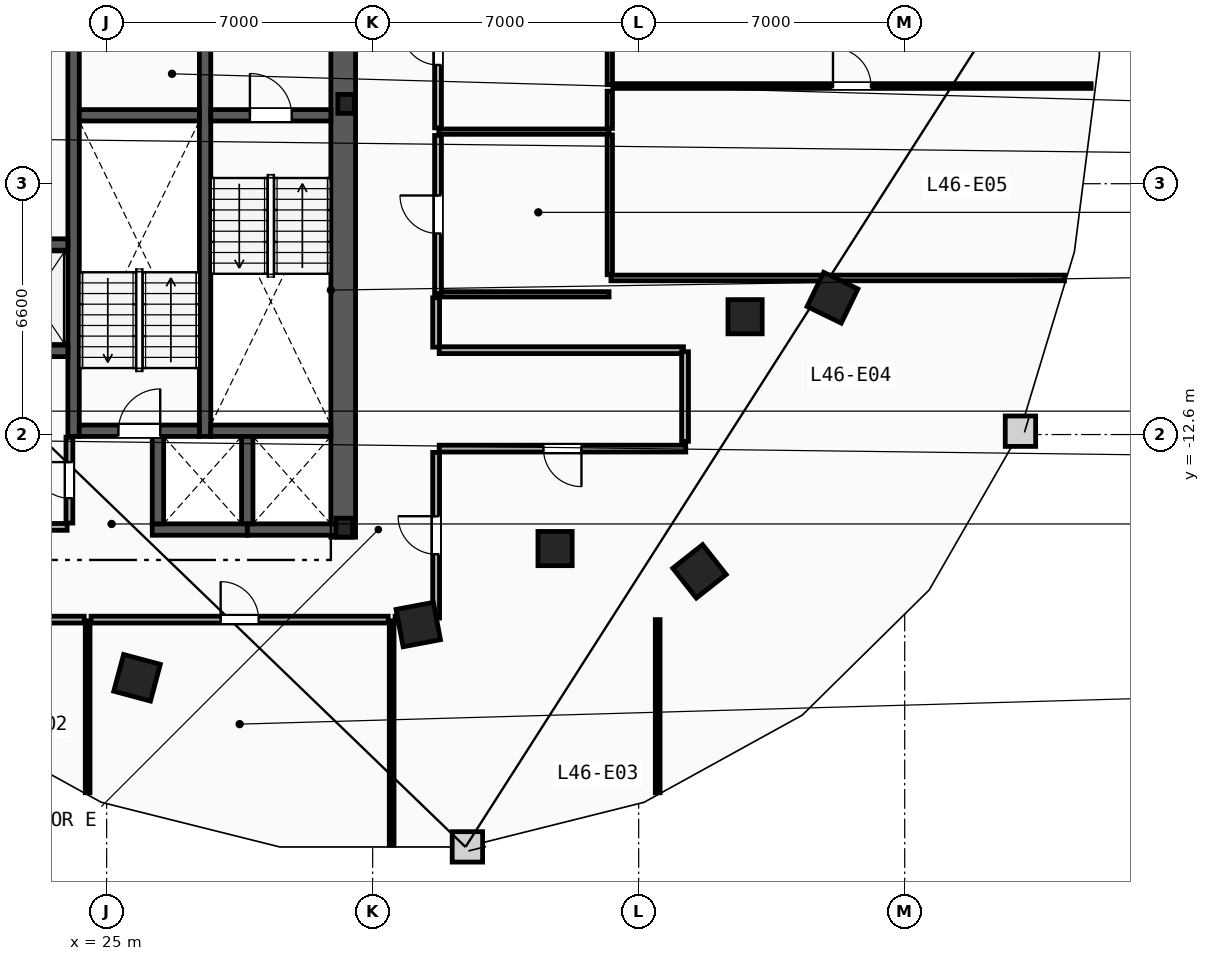
"""IFC4 building model, lengths in metres.
Left out: names, types, materials, properties, quantities, classifications, styles, units other than length and angle.
Written with IfcOpenShell. Run it as: python <this file> out.ifc"""

import sys

from ifc_helpers import new_model, si_unit, direction, frame, frame_2d, origin, origin_2d, place, context, subcontext, project, spatial, rectangle, i_section, extrude, element, fill, save


model = new_model("IFC4")
c1 = context("Model", 3, precision=1e-05, world=origin(), true_north=direction((0.0, 1.0)))
c2 = subcontext(c1, "Body", "Model", "MODEL_VIEW")
j1 = project(units=[si_unit("LENGTHUNIT", "METRE"), si_unit("PLANEANGLEUNIT", "RADIAN")], contexts=[c1])
p1 = place(None, origin())
s1 = spatial("IfcSite", under=j1, at=p1, CompositionType="ELEMENT")
p2 = place(p1, origin())
s2 = spatial("IfcBuilding", under=s1, at=p2, CompositionType="ELEMENT")
p3 = place(p2, frame((0.0, 0.0, 176.4)))
s3 = spatial("IfcBuildingStorey", under=s2, at=p3, CompositionType="ELEMENT", Elevation=176.4)
for number, where, z_axis, x_axis in (
    (1, (31.3, -3.9, 0.0), (0.0, 0.0, 1.0), (1.0, 0.0, 0.0)),
    (2, (31.25, -15.05, 0.0), (0.0, 0.0, 1.0), (1.0, 0.0, 0.0)),
):
    element("IfcColumn", number, at=place(p3, frame(where, z_axis=z_axis, x_axis=x_axis)), inside=s3, PredefinedType="COLUMN", context=c2, shape_type="SweptSolid", body=[
        extrude(i_section(OverallWidth=0.432, OverallDepth=0.498, WebThickness=0.056, FlangeThickness=0.089, FilletRadius=0.018, at=origin_2d()), origin(), (0.0, 0.0, 1.0), 3.6),
    ])
for number, where, z_axis, x_axis in (
    (3, (41.8, -9.5, 0.0), (0.0, 0.0, 1.0), (1.0, 0.0, 0.0)),
    (4, (36.8, -15.6, 0.0), (0.0, 0.0, 1.0), (1.0, 0.0, 0.0)),
):
    element("IfcColumn", number, at=place(p3, frame(where, z_axis=z_axis, x_axis=x_axis)), inside=s3, PredefinedType="COLUMN", context=c2, shape_type="SweptSolid", body=[
        extrude(rectangle(XDim=0.9, YDim=0.9, at=origin_2d()), origin(), (0.0, 0.0, 1.0), 3.6),
    ])
for number, where, z_axis, x_axis in (
    (5, (25.8, -19.0, 0.0), (0.0, 0.0, 1.0), (0.966, -0.259, 0.0)),
    (6, (33.2, -17.6, 0.0), (0.0, 0.0, 1.0), (0.983, 0.186, 0.0)),
    (7, (40.6, -16.2, 0.0), (0.0, 0.0, 1.0), (0.785, 0.619, 0.0)),
    (8, (44.1, -9.0, 0.0), (0.0, 0.0, 1.0), (0.437, 0.899, 0.0)),
):
    element("IfcColumn", number, at=place(p3, frame(where, z_axis=z_axis, x_axis=x_axis)), inside=s3, PredefinedType="COLUMN", context=c2, shape_type="SweptSolid", body=[
        extrude(rectangle(XDim=1.0, YDim=1.0, at=origin_2d()), origin(), (0.0, 0.0, 1.0), 3.6),
    ])
p4 = place(p3, frame((31.225, -15.3, 0.0), z_axis=(0.0, 0.0, 1.0), x_axis=(0.0, 1.0, 0.0)))
e9 = element("IfcWall", 9, at=p4, inside=s3, PredefinedType="SHEAR", context=c2, shape_type="SweptSolid", body=[
    extrude(rectangle(XDim=13.33, YDim=0.65, at=frame_2d((6.665, 0.0))), origin(), (0.0, 0.0, 1.0), 3.36),
])
for number, where, z_axis, x_axis in (
    (10, (27.59, -12.65, 0.0), (0.0, 0.0, 1.0), (0.0, 1.0, 0.0)),
    (11, (24.13, -12.65, 0.0), (0.0, 0.0, 1.0), (0.0, 1.0, 0.0)),
):
    element("IfcWall", number, at=place(p3, frame(where, z_axis=z_axis, x_axis=x_axis)), inside=s3, PredefinedType="SHEAR", context=c2, shape_type="SweptSolid", body=[
        extrude(rectangle(XDim=10.68, YDim=0.3, at=frame_2d((5.34, 0.0))), origin(), (0.0, 0.0, 1.0), 3.36),
    ])
p5 = place(p3, frame((27.74, -4.2, 0.0), z_axis=(0.0, 0.0, 1.0), x_axis=(1.0, 0.0, 0.0)))
e12 = element("IfcWall", 12, at=p5, inside=s3, PredefinedType="SHEAR", context=c2, shape_type="SweptSolid", body=[
    extrude(rectangle(XDim=3.16, YDim=0.3, at=frame_2d((1.58, 0.0))), origin(), (0.0, 0.0, 1.0), 3.36),
])
p6 = place(p5, frame((1.03, 0.0, 0.0)))
e13 = element("IfcOpeningElement", 13, at=p6, cuts=e12, PredefinedType="OPENING", context=c2, shape_type="SweptSolid", body=[
    extrude(rectangle(XDim=1.1, YDim=2.15, at=frame_2d((0.55, 1.075))), frame((0.0, 0.16, 0.0), z_axis=(0.0, -1.0, 0.0), x_axis=(1.0, 0.0, 0.0)), (0.0, 0.0, 1.0), 0.32),
])
p7 = place(p3, frame((27.74, -12.5, 0.0), z_axis=(0.0, 0.0, 1.0), x_axis=(1.0, 0.0, 0.0)))
e14 = element("IfcWall", 14, at=p7, inside=s3, PredefinedType="SHEAR", context=c2, shape_type="SweptSolid", body=[
    extrude(rectangle(XDim=3.16, YDim=0.3, at=frame_2d((1.58, 0.0))), origin(), (0.0, 0.0, 1.0), 3.36),
])
p8 = place(p3, frame((24.28, -12.5, 0.0), z_axis=(0.0, 0.0, 1.0), x_axis=(1.0, 0.0, 0.0)))
e15 = element("IfcWall", 15, at=p8, inside=s3, PredefinedType="SHEAR", context=c2, shape_type="SweptSolid", body=[
    extrude(rectangle(XDim=3.16, YDim=0.3, at=frame_2d((1.58, 0.0))), origin(), (0.0, 0.0, 1.0), 3.36),
])
p9 = place(p8, frame((1.03, 0.0, 0.0)))
e16 = element("IfcOpeningElement", 16, at=p9, cuts=e15, PredefinedType="OPENING", context=c2, shape_type="SweptSolid", body=[
    extrude(rectangle(XDim=1.1, YDim=2.15, at=frame_2d((0.55, 1.075))), frame((0.0, 0.16, 0.0), z_axis=(0.0, -1.0, 0.0), x_axis=(1.0, 0.0, 0.0)), (0.0, 0.0, 1.0), 0.32),
])
p10 = place(p3, frame((24.28, -4.2, 0.0), z_axis=(0.0, 0.0, 1.0), x_axis=(1.0, 0.0, 0.0)))
e17 = element("IfcWall", 17, at=p10, inside=s3, PredefinedType="SHEAR", context=c2, shape_type="SweptSolid", body=[
    extrude(rectangle(XDim=3.16, YDim=0.3, at=frame_2d((1.58, 0.0))), origin(), (0.0, 0.0, 1.0), 3.36),
])
p11 = place(p3, frame((21.88, -7.6, 0.0), z_axis=(0.0, 0.0, 1.0), x_axis=(1.0, 0.0, 0.0)))
e18 = element("IfcWall", 18, at=p11, inside=s3, PredefinedType="SHEAR", context=c2, shape_type="SweptSolid", body=[
    extrude(rectangle(XDim=2.1, YDim=0.3, at=frame_2d((1.05, 0.0))), origin(), (0.0, 0.0, 1.0), 3.36),
])
p12 = place(p11, frame((0.475, 0.0, 0.0)))
e19 = element("IfcOpeningElement", 19, at=p12, cuts=e18, PredefinedType="OPENING", context=c2, shape_type="SweptSolid", body=[
    extrude(rectangle(XDim=1.15, YDim=2.2, at=frame_2d((0.575, 1.1))), frame((0.0, 0.16, 0.0), z_axis=(0.0, -1.0, 0.0), x_axis=(1.0, 0.0, 0.0)), (0.0, 0.0, 1.0), 0.32),
])
p13 = place(p3, frame((21.88, -10.4, 0.0), z_axis=(0.0, 0.0, 1.0), x_axis=(1.0, 0.0, 0.0)))
e20 = element("IfcWall", 20, at=p13, inside=s3, PredefinedType="SHEAR", context=c2, shape_type="SweptSolid", body=[
    extrude(rectangle(XDim=2.1, YDim=0.3, at=frame_2d((1.05, 0.0))), origin(), (0.0, 0.0, 1.0), 3.36),
])
p14 = place(p3, frame((28.7, -15.1, 0.0), z_axis=(0.0, 0.0, 1.0), x_axis=(1.0, 0.0, 0.0)))
e21 = element("IfcWall", 21, at=p14, inside=s3, PredefinedType="SHEAR", context=c2, shape_type="SweptSolid", body=[
    extrude(rectangle(XDim=2.5, YDim=0.3, at=frame_2d((1.25, 0.0))), origin(), (0.0, 0.0, 1.0), 3.36),
])
p15 = place(p3, frame((28.7, -14.95, 0.0), z_axis=(0.0, 0.0, 1.0), x_axis=(0.0, 1.0, 0.0)))
e22 = element("IfcWall", 22, at=p15, inside=s3, PredefinedType="SHEAR", context=c2, shape_type="SweptSolid", body=[
    extrude(rectangle(XDim=2.3, YDim=0.3, at=frame_2d((1.15, 0.0))), origin(), (0.0, 0.0, 1.0), 3.36),
])
p16 = place(p3, frame((26.2, -15.1, 0.0), z_axis=(0.0, 0.0, 1.0), x_axis=(1.0, 0.0, 0.0)))
e23 = element("IfcWall", 23, at=p16, inside=s3, PredefinedType="SHEAR", context=c2, shape_type="SweptSolid", body=[
    extrude(rectangle(XDim=2.5, YDim=0.3, at=frame_2d((1.25, 0.0))), origin(), (0.0, 0.0, 1.0), 3.36),
])
p17 = place(p3, frame((26.35, -14.95, 0.0), z_axis=(0.0, 0.0, 1.0), x_axis=(0.0, 1.0, 0.0)))
e24 = element("IfcWall", 24, at=p17, inside=s3, PredefinedType="SHEAR", context=c2, shape_type="SweptSolid", body=[
    extrude(rectangle(XDim=2.3, YDim=0.3, at=frame_2d((1.15, 0.0))), origin(), (0.0, 0.0, 1.0), 3.36),
])
p18 = place(p3, frame((21.35, -15.03, 0.0), z_axis=(0.0, 0.0, 1.0), x_axis=(1.0, 0.0, 0.0)))
e25 = element("IfcWall", 25, at=p18, inside=s3, PredefinedType="PARTITIONING", context=c2, shape_type="SweptSolid", body=[
    extrude(rectangle(XDim=2.61, YDim=0.18, at=frame_2d((1.305, 0.0))), origin(), (0.0, 0.0, 1.0), 2.433),
])
p19 = place(p3, frame((24.02, -14.93, 0.0), z_axis=(0.0, 0.0, 1.0), x_axis=(0.0, 1.0, 0.0)))
e26 = element("IfcWall", 26, at=p19, inside=s3, PredefinedType="PARTITIONING", context=c2, shape_type="SweptSolid", body=[
    extrude(rectangle(XDim=2.26, YDim=0.18, at=frame_2d((1.13, 0.0))), origin(), (0.0, 0.0, 1.0), 3.36),
])
p20 = place(p19, frame((0.655, 0.0, 0.0)))
e27 = element("IfcOpeningElement", 27, at=p20, cuts=e26, PredefinedType="OPENING", context=c2, shape_type="SweptSolid", body=[
    extrude(rectangle(XDim=0.95, YDim=2.1, at=frame_2d((0.475, 1.05))), frame((0.0, 0.1, 0.0), z_axis=(0.0, -1.0, 0.0), x_axis=(1.0, 0.0, 0.0)), (0.0, 0.0, 1.0), 0.2),
])
p21 = place(p3, frame((38.24, -8.395, 0.0), z_axis=(0.0, 0.0, 1.0), x_axis=(0.0, 1.0, 0.0)))
e28 = element("IfcWall", 28, at=p21, inside=s3, PredefinedType="PARTITIONING", context=c2, shape_type="SweptSolid", body=[
    extrude(rectangle(XDim=3.68, YDim=0.14, at=frame_2d((1.84, 0.0))), origin(), (0.0, 0.0, 1.0), 3.36),
])
p22 = place(p3, frame((38.24, -4.545, 0.0), z_axis=(0.0, 0.0, 1.0), x_axis=(0.0, 1.0, 0.0)))
e29 = element("IfcWall", 29, at=p22, inside=s3, PredefinedType="PARTITIONING", context=c2, shape_type="SweptSolid", body=[
    extrude(rectangle(XDim=0.98, YDim=0.14, at=frame_2d((0.49, 0.0))), origin(), (0.0, 0.0, 1.0), 3.36),
])
p23 = place(p3, frame((38.24, -3.395, 0.0), z_axis=(0.0, 0.0, 1.0), x_axis=(0.0, 1.0, 0.0)))
e30 = element("IfcWall", 30, at=p23, inside=s3, PredefinedType="PARTITIONING", context=c2, shape_type="SweptSolid", body=[
    extrude(rectangle(XDim=3.125, YDim=0.14, at=frame_2d((1.562, 0.0))), origin(), (0.0, 0.0, 1.0), 3.36),
])
for number, where, z_axis, x_axis in (
    (31, (33.74, -4.63, 0.0), (0.0, 0.0, 1.0), (1.0, 0.0, 0.0)),
    (32, (33.74, -8.91, 0.0), (0.0, 0.0, 1.0), (1.0, 0.0, 0.0)),
):
    element("IfcWall", number, at=place(p3, frame(where, z_axis=z_axis, x_axis=x_axis)), inside=s3, PredefinedType="PARTITIONING", context=c2, shape_type="SweptSolid", body=[
        extrude(rectangle(XDim=4.48, YDim=0.14, at=frame_2d((2.24, 0.0))), origin(), (0.0, 0.0, 1.0), 3.36),
    ])
p24 = place(p3, frame((33.72, -4.53, 0.0), z_axis=(0.0, 0.0, 1.0), x_axis=(0.0, 1.0, 0.0)))
e33 = element("IfcWall", 33, at=p24, inside=s3, PredefinedType="PARTITIONING", context=c2, shape_type="SweptSolid", body=[
    extrude(rectangle(XDim=4.26, YDim=0.18, at=frame_2d((2.13, 0.0))), origin(), (0.0, 0.0, 1.0), 3.36),
])
p25 = place(p24, frame((1.655, 0.0, 0.0)))
e34 = element("IfcOpeningElement", 34, at=p25, cuts=e33, PredefinedType="OPENING", context=c2, shape_type="SweptSolid", body=[
    extrude(rectangle(XDim=0.95, YDim=2.1, at=frame_2d((0.475, 1.05))), frame((0.0, 0.1, 0.0), z_axis=(0.0, -1.0, 0.0), x_axis=(1.0, 0.0, 0.0)), (0.0, 0.0, 1.0), 0.2),
])
p26 = place(p3, frame((33.72, -8.89, 0.0), z_axis=(0.0, 0.0, 1.0), x_axis=(0.0, 1.0, 0.0)))
e35 = element("IfcWall", 35, at=p26, inside=s3, PredefinedType="PARTITIONING", context=c2, shape_type="SweptSolid", body=[
    extrude(rectangle(XDim=4.16, YDim=0.18, at=frame_2d((2.08, 0.0))), origin(), (0.0, 0.0, 1.0), 3.36),
])
p27 = place(p26, frame((1.58, 0.0, 0.0)))
e36 = element("IfcOpeningElement", 36, at=p27, cuts=e35, PredefinedType="OPENING", context=c2, shape_type="SweptSolid", body=[
    extrude(rectangle(XDim=1.0, YDim=2.15, at=frame_2d((0.5, 1.075))), frame((0.0, 0.1, 0.0), z_axis=(0.0, -1.0, 0.0), x_axis=(1.0, 0.0, 0.0)), (0.0, 0.0, 1.0), 0.2),
])
p28 = place(p3, frame((38.27, -8.48, 0.0), z_axis=(0.0, 0.0, 1.0), x_axis=(1.0, 0.0, 0.0)))
e37 = element("IfcWall", 37, at=p28, inside=s3, PredefinedType="PARTITIONING", context=c2, shape_type="SweptSolid", body=[
    extrude(rectangle(XDim=11.936, YDim=0.15, at=frame_2d((5.968, 0.0))), origin(), (0.0, 0.0, 1.0), 3.36),
])
p29 = place(p3, frame((24.5, -22.025, 0.0), z_axis=(0.0, 0.0, 1.0), x_axis=(0.0, 1.0, 0.0)))
e38 = element("IfcWall", 38, at=p29, inside=s3, PredefinedType="PARTITIONING", context=c2, shape_type="SweptSolid", body=[
    extrude(rectangle(XDim=4.525, YDim=0.125, at=frame_2d((2.263, 0.0))), origin(), (0.0, 0.0, 1.0), 3.36),
])
p30 = place(p3, frame((32.5, -23.402, 0.0), z_axis=(0.0, 0.0, 1.0), x_axis=(0.0, 1.0, 0.0)))
e39 = element("IfcWall", 39, at=p30, inside=s3, PredefinedType="PARTITIONING", context=c2, shape_type="SweptSolid", body=[
    extrude(rectangle(XDim=5.902, YDim=0.125, at=frame_2d((2.951, 0.0))), origin(), (0.0, 0.0, 1.0), 3.36),
])
p31 = place(p3, frame((39.5, -22.025, 0.0), z_axis=(0.0, 0.0, 1.0), x_axis=(0.0, 1.0, 0.0)))
e40 = element("IfcWall", 40, at=p31, inside=s3, PredefinedType="PARTITIONING", context=c2, shape_type="SweptSolid", body=[
    extrude(rectangle(XDim=4.555, YDim=0.125, at=frame_2d((2.278, 0.0))), origin(), (0.0, 0.0, 1.0), 3.36),
])
p32 = place(p3, frame((24.59, -17.47, 0.0), z_axis=(0.0, 0.0, 1.0), x_axis=(1.0, 0.0, 0.0)))
e41 = element("IfcWall", 41, at=p32, inside=s3, PredefinedType="PARTITIONING", context=c2, shape_type="SweptSolid", body=[
    extrude(rectangle(XDim=7.82, YDim=0.18, at=frame_2d((3.91, 0.0))), origin(), (0.0, 0.0, 1.0), 3.36),
])
p33 = place(p32, frame((3.41, 0.0, 0.0)))
e42 = element("IfcOpeningElement", 42, at=p33, cuts=e41, PredefinedType="OPENING", context=c2, shape_type="SweptSolid", body=[
    extrude(rectangle(XDim=1.0, YDim=2.15, at=frame_2d((0.5, 1.075))), frame((0.0, 0.1, 0.0), z_axis=(0.0, -1.0, 0.0), x_axis=(1.0, 0.0, 0.0)), (0.0, 0.0, 1.0), 0.2),
])
p34 = place(p3, frame((18.342, -17.47, 0.0), z_axis=(0.0, 0.0, 1.0), x_axis=(1.0, 0.0, 0.0)))
e43 = element("IfcWall", 43, at=p34, inside=s3, PredefinedType="PARTITIONING", context=c2, shape_type="SweptSolid", body=[
    extrude(rectangle(XDim=6.068, YDim=0.18, at=frame_2d((3.034, 0.0))), origin(), (0.0, 0.0, 1.0), 3.36),
])
p35 = place(p34, frame((2.534, 0.0, 0.0)))
e44 = element("IfcOpeningElement", 44, at=p35, cuts=e43, PredefinedType="OPENING", context=c2, shape_type="SweptSolid", body=[
    extrude(rectangle(XDim=1.0, YDim=2.15, at=frame_2d((0.5, 1.075))), frame((0.0, 0.1, 0.0), z_axis=(0.0, -1.0, 0.0), x_axis=(1.0, 0.0, 0.0)), (0.0, 0.0, 1.0), 0.2),
])
p36 = place(p3, frame((33.67, -17.428, 0.0), z_axis=(0.0, 0.0, 1.0), x_axis=(0.0, 1.0, 0.0)))
e45 = element("IfcWall", 45, at=p36, inside=s3, PredefinedType="PARTITIONING", context=c2, shape_type="SweptSolid", body=[
    extrude(rectangle(XDim=4.358, YDim=0.18, at=frame_2d((2.179, 0.0))), origin(), (0.0, 0.0, 1.0), 3.36),
])
p37 = place(p36, frame((1.679, 0.0, 0.0)))
e46 = element("IfcOpeningElement", 46, at=p37, cuts=e45, PredefinedType="OPENING", context=c2, shape_type="SweptSolid", body=[
    extrude(rectangle(XDim=1.0, YDim=2.15, at=frame_2d((0.5, 1.075))), frame((0.0, 0.1, 0.0), z_axis=(0.0, -1.0, 0.0), x_axis=(1.0, 0.0, 0.0)), (0.0, 0.0, 1.0), 0.2),
])
p38 = place(p3, frame((32.59, -17.47, 0.0), z_axis=(0.0, 0.0, 1.0), x_axis=(1.0, 0.0, 0.0)))
e47 = element("IfcWall", 47, at=p38, inside=s3, PredefinedType="PARTITIONING", context=c2, shape_type="SweptSolid", body=[
    extrude(rectangle(XDim=1.038, YDim=0.18, at=frame_2d((0.519, 0.0))), origin(), (0.0, 0.0, 1.0), 3.36),
])
p39 = place(p3, frame((40.239, -12.97, 0.0), z_axis=(0.0, 0.0, 1.0), x_axis=(-1.0, 0.0, 0.0)))
e48 = element("IfcWall", 48, at=p39, inside=s3, PredefinedType="PARTITIONING", context=c2, shape_type="SweptSolid", body=[
    extrude(rectangle(XDim=6.489, YDim=0.18, at=frame_2d((3.244, 0.0))), origin(), (0.0, 0.0, 1.0), 3.36),
])
p40 = place(p39, frame((2.744, 0.0, 0.0)))
e49 = element("IfcOpeningElement", 49, at=p40, cuts=e48, PredefinedType="OPENING", context=c2, shape_type="SweptSolid", body=[
    extrude(rectangle(XDim=1.0, YDim=2.15, at=frame_2d((0.5, 1.075))), frame((0.0, 0.1, 0.0), z_axis=(0.0, -1.0, 0.0), x_axis=(1.0, 0.0, 0.0)), (0.0, 0.0, 1.0), 0.2),
])
p41 = place(p3, frame((40.178, -10.38, 0.0), z_axis=(0.0, 0.0, 1.0), x_axis=(-1.0, 0.0, 0.0)))
e50 = element("IfcWall", 50, at=p41, inside=s3, PredefinedType="PARTITIONING", context=c2, shape_type="SweptSolid", body=[
    extrude(rectangle(XDim=6.428, YDim=0.18, at=frame_2d((3.214, 0.0))), origin(), (0.0, 0.0, 1.0), 3.36),
])
p42 = place(p3, frame((40.22, -12.779, 0.0), z_axis=(0.0, 0.0, 1.0), x_axis=(0.0, 1.0, 0.0)))
e51 = element("IfcWall", 51, at=p42, inside=s3, PredefinedType="PARTITIONING", context=c2, shape_type="SweptSolid", body=[
    extrude(rectangle(XDim=2.357, YDim=0.18, at=frame_2d((1.179, 0.0))), origin(), (0.0, 0.0, 1.0), 3.36),
])
p43 = place(p3, frame((33.67, -10.3, 0.0), z_axis=(0.0, 0.0, 1.0), x_axis=(0.0, 1.0, 0.0)))
e52 = element("IfcWall", 52, at=p43, inside=s3, PredefinedType="PARTITIONING", context=c2, shape_type="SweptSolid", body=[
    extrude(rectangle(XDim=1.299, YDim=0.18, at=frame_2d((0.649, 0.0))), origin(), (0.0, 0.0, 1.0), 3.36),
])
p44 = place(p3, frame((38.32, -3.43, 0.0), z_axis=(0.0, 0.0, 1.0), x_axis=(1.0, 0.0, 0.0)))
e53 = element("IfcWall", 53, at=p44, inside=s3, PredefinedType="PARTITIONING", context=c2, shape_type="SweptSolid", body=[
    extrude(rectangle(XDim=12.585, YDim=0.125, at=frame_2d((6.293, 0.0))), origin(), (0.0, 0.0, 1.0), 3.36),
])
p45 = place(p44, frame((5.793, 0.0, 0.0)))
e54 = element("IfcOpeningElement", 54, at=p45, cuts=e53, PredefinedType="OPENING", context=c2, shape_type="SweptSolid", body=[
    extrude(rectangle(XDim=1.0, YDim=2.15, at=frame_2d((0.5, 1.075))), frame((0.0, 0.073, 0.0), z_axis=(0.0, -1.0, 0.0), x_axis=(1.0, 0.0, 0.0)), (0.0, 0.0, 1.0), 0.145),
])
p46 = place(p6, origin())
e55 = element("IfcDoor", 55, at=p46, inside=s3, OperationType="SINGLE_SWING_LEFT", PredefinedType="DOOR", context=c2, shape_type="SweptSolid", body=[
    extrude(rectangle(XDim=1.1, YDim=2.15, at=frame_2d((0.55, 1.075))), frame((0.0, 0.025, 0.0), z_axis=(0.0, -1.0, 0.0), x_axis=(1.0, 0.0, 0.0)), (0.0, 0.0, 1.0), 0.05),
])
fill(e13, e55)
p47 = place(p9, origin())
e56 = element("IfcDoor", 56, at=p47, inside=s3, OperationType="SINGLE_SWING_RIGHT", PredefinedType="DOOR", context=c2, shape_type="SweptSolid", body=[
    extrude(rectangle(XDim=1.1, YDim=2.15, at=frame_2d((0.55, 1.075))), frame((0.0, 0.025, 0.0), z_axis=(0.0, -1.0, 0.0), x_axis=(1.0, 0.0, 0.0)), (0.0, 0.0, 1.0), 0.05),
])
fill(e16, e56)
p48 = place(p45, origin())
e57 = element("IfcDoor", 57, at=p48, inside=s3, OperationType="SINGLE_SWING_LEFT", PredefinedType="DOOR", context=c2, shape_type="SweptSolid", body=[
    extrude(rectangle(XDim=1.0, YDim=2.15, at=frame_2d((0.5, 1.075))), frame((0.0, 0.025, 0.0), z_axis=(0.0, -1.0, 0.0), x_axis=(1.0, 0.0, 0.0)), (0.0, 0.0, 1.0), 0.05),
])
fill(e54, e57)
p49 = place(p33, origin())
e58 = element("IfcDoor", 58, at=p49, inside=s3, OperationType="SINGLE_SWING_LEFT", PredefinedType="DOOR", context=c2, shape_type="SweptSolid", body=[
    extrude(rectangle(XDim=1.0, YDim=2.15, at=frame_2d((0.5, 1.075))), frame((0.0, 0.025, 0.0), z_axis=(0.0, -1.0, 0.0), x_axis=(1.0, 0.0, 0.0)), (0.0, 0.0, 1.0), 0.05),
])
fill(e42, e58)
p50 = place(p40, origin())
e59 = element("IfcDoor", 59, at=p50, inside=s3, OperationType="SINGLE_SWING_LEFT", PredefinedType="DOOR", context=c2, shape_type="SweptSolid", body=[
    extrude(rectangle(XDim=1.0, YDim=2.15, at=frame_2d((0.5, 1.075))), frame((0.0, 0.025, 0.0), z_axis=(0.0, -1.0, 0.0), x_axis=(1.0, 0.0, 0.0)), (0.0, 0.0, 1.0), 0.05),
])
fill(e49, e59)
p51 = place(p37, origin())
e60 = element("IfcDoor", 60, at=p51, inside=s3, OperationType="SINGLE_SWING_RIGHT", PredefinedType="DOOR", context=c2, shape_type="SweptSolid", body=[
    extrude(rectangle(XDim=1.0, YDim=2.15, at=frame_2d((0.5, 1.075))), frame((0.0, 0.025, 0.0), z_axis=(0.0, -1.0, 0.0), x_axis=(1.0, 0.0, 0.0)), (0.0, 0.0, 1.0), 0.05),
])
fill(e46, e60)
p52 = place(p25, origin())
e61 = element("IfcDoor", 61, at=p52, inside=s3, OperationType="SINGLE_SWING_RIGHT", PredefinedType="DOOR", context=c2, shape_type="SweptSolid", body=[
    extrude(rectangle(XDim=0.95, YDim=2.1, at=frame_2d((0.475, 1.05))), frame((0.0, 0.025, 0.0), z_axis=(0.0, -1.0, 0.0), x_axis=(1.0, 0.0, 0.0)), (0.0, 0.0, 1.0), 0.05),
])
fill(e34, e61)
p53 = place(p27, origin())
e62 = element("IfcDoor", 62, at=p53, inside=s3, OperationType="SINGLE_SWING_RIGHT", PredefinedType="DOOR", context=c2, shape_type="SweptSolid", body=[
    extrude(rectangle(XDim=1.0, YDim=2.15, at=frame_2d((0.5, 1.075))), frame((0.0, 0.025, 0.0), z_axis=(0.0, -1.0, 0.0), x_axis=(1.0, 0.0, 0.0)), (0.0, 0.0, 1.0), 0.05),
])
fill(e36, e62)
p54 = place(p20, origin())
e63 = element("IfcDoor", 63, at=p54, inside=s3, OperationType="SINGLE_SWING_RIGHT", PredefinedType="DOOR", context=c2, shape_type="SweptSolid", body=[
    extrude(rectangle(XDim=0.95, YDim=2.1, at=frame_2d((0.475, 1.05))), frame((0.0, 0.025, 0.0), z_axis=(0.0, -1.0, 0.0), x_axis=(1.0, 0.0, 0.0)), (0.0, 0.0, 1.0), 0.05),
])
fill(e27, e63)
save(model, sys.argv[1])
